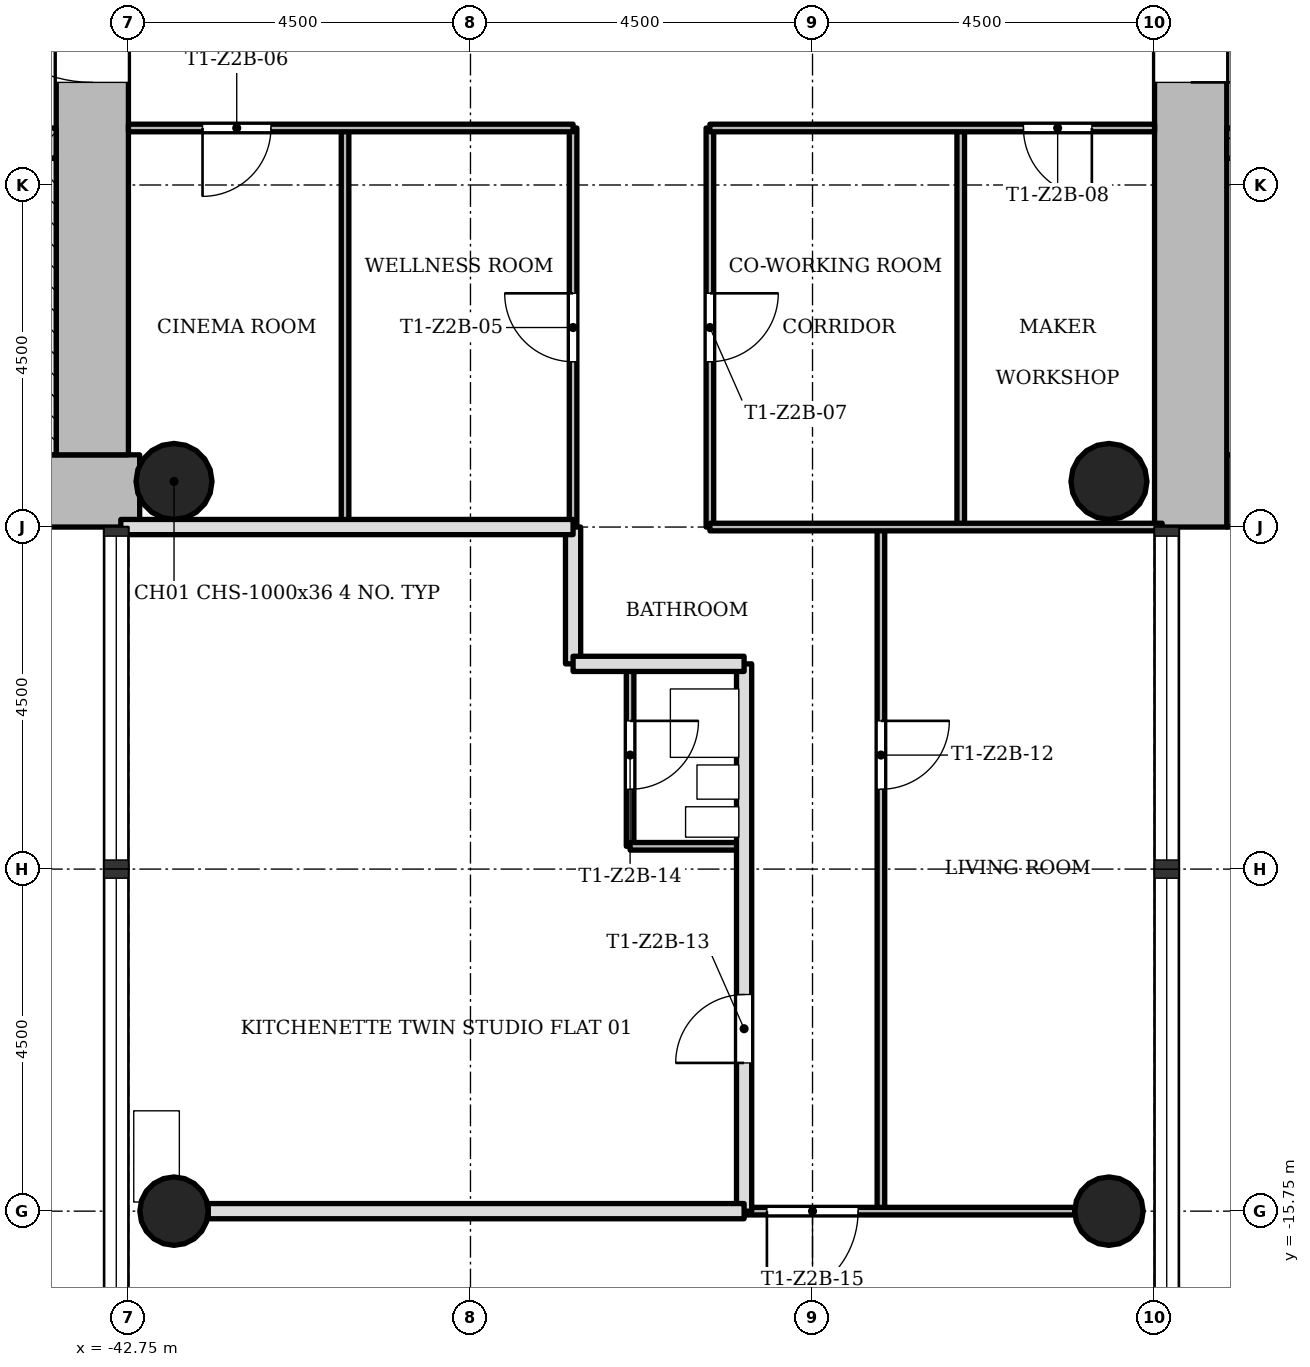
"""IFC4 building model, lengths in metres.
Left out: names, types, materials, properties, quantities, classifications, styles, units other than length and angle.
Written with IfcOpenShell. Run it as: python <this file> out.ifc"""

import sys

from ifc_helpers import new_model, si_unit, direction, frame, frame_2d, origin, origin_2d, place, context, subcontext, project, spatial, rectangle, hollow_circle, extrude, element, fill, save


model = new_model("IFC4")
c1 = context("Model", 3, precision=1e-05, world=origin(), true_north=direction((0.0, 1.0)))
c2 = subcontext(c1, "Body", "Model", "MODEL_VIEW")
j1 = project(units=[si_unit("LENGTHUNIT", "METRE"), si_unit("PLANEANGLEUNIT", "RADIAN")], contexts=[c1])
p1 = place(None, origin())
s1 = spatial("IfcSite", under=j1, at=p1, CompositionType="ELEMENT")
p2 = place(p1, origin())
s2 = spatial("IfcBuilding", under=s1, at=p2, CompositionType="ELEMENT")
p3 = place(p2, frame((0.0, 0.0, 83.4)))
s3 = spatial("IfcBuildingStorey", under=s2, at=p3, CompositionType="ELEMENT", Elevation=83.4)
p4 = place(p3, frame((-28.3, -6.275, 0.0), z_axis=(0.0, 0.0, 1.0), x_axis=(1.0, 0.0, 0.0)))
e1 = element("IfcWall", 1, at=p4, inside=s3, PredefinedType="SHEAR", context=c2, shape_type="SweptSolid", body=[
    extrude(rectangle(XDim=8.05, YDim=0.95, at=frame_2d((4.025, 0.0))), origin(), (0.0, 0.0, 1.0), 3.4),
])
p5 = place(p3, frame((-28.775, 5.8, 0.0), z_axis=(0.0, 0.0, 1.0), x_axis=(0.0, -1.0, 0.0)))
e2 = element("IfcWall", 2, at=p5, inside=s3, PredefinedType="SHEAR", context=c2, shape_type="SweptSolid", body=[
    extrude(rectangle(XDim=12.55, YDim=0.95, at=frame_2d((6.275, 0.0))), origin(), (0.0, 0.0, 1.0), 3.4),
])
p6 = place(p5, frame((4.9, 0.0, 0.0)))
e3 = element("IfcOpeningElement", 3, at=p6, cuts=e2, PredefinedType="OPENING", context=c2, shape_type="SweptSolid", body=[
    extrude(rectangle(XDim=1.8, YDim=2.1, at=frame_2d((0.9, 1.05))), frame((0.0, 0.485, 0.0), z_axis=(0.0, -1.0, 0.0), x_axis=(1.0, 0.0, 0.0)), (0.0, 0.0, 1.0), 0.97),
])
p7 = place(p3, frame((-28.3, -1.7, 0.0), z_axis=(0.0, 0.0, 1.0), x_axis=(1.0, 0.0, 0.0)))
e4 = element("IfcWall", 4, at=p7, inside=s3, PredefinedType="SHEAR", context=c2, shape_type="SweptSolid", body=[
    extrude(rectangle(XDim=7.1, YDim=0.4, at=frame_2d((3.55, 0.0))), origin(), (0.0, 0.0, 1.0), 3.4),
])
p8 = place(p7, frame((0.8, 0.0, 0.0)))
e5 = element("IfcOpeningElement", 5, at=p8, cuts=e4, PredefinedType="OPENING", context=c2, shape_type="SweptSolid", body=[
    extrude(rectangle(XDim=1.1, YDim=2.1, at=frame_2d((0.55, 1.05))), frame((0.0, 0.21, 0.0), z_axis=(0.0, -1.0, 0.0), x_axis=(1.0, 0.0, 0.0)), (0.0, 0.0, 1.0), 0.42),
])
p9 = place(p7, frame((3.0, 0.0, 0.0)))
e6 = element("IfcOpeningElement", 6, at=p9, cuts=e4, PredefinedType="OPENING", context=c2, shape_type="SweptSolid", body=[
    extrude(rectangle(XDim=1.1, YDim=2.1, at=frame_2d((0.55, 1.05))), frame((0.0, 0.21, 0.0), z_axis=(0.0, -1.0, 0.0), x_axis=(1.0, 0.0, 0.0)), (0.0, 0.0, 1.0), 0.42),
])
p10 = place(p7, frame((5.2, 0.0, 0.0)))
e7 = element("IfcOpeningElement", 7, at=p10, cuts=e4, PredefinedType="OPENING", context=c2, shape_type="SweptSolid", body=[
    extrude(rectangle(XDim=1.1, YDim=2.1, at=frame_2d((0.55, 1.05))), frame((0.0, 0.21, 0.0), z_axis=(0.0, -1.0, 0.0), x_axis=(1.0, 0.0, 0.0)), (0.0, 0.0, 1.0), 0.42),
])
p11 = place(p3, frame((-51.298, -6.275, 0.0), z_axis=(0.0, 0.0, 1.0), x_axis=(1.0, 0.0, 0.0)))
e8 = element("IfcWall", 8, at=p11, inside=s3, PredefinedType="SHEAR", context=c2, shape_type="SweptSolid", body=[
    extrude(rectangle(XDim=8.696, YDim=0.95, at=frame_2d((4.348, 0.0))), origin(), (0.0, 0.0, 1.0), 3.4),
])
p12 = place(p3, frame((-43.225, -5.8, 0.0), z_axis=(0.0, 0.0, 1.0), x_axis=(0.0, 1.0, 0.0)))
e9 = element("IfcWall", 9, at=p12, inside=s3, PredefinedType="SHEAR", context=c2, shape_type="SweptSolid", body=[
    extrude(rectangle(XDim=12.55, YDim=0.95, at=frame_2d((6.275, 0.0))), origin(), (0.0, 0.0, 1.0), 3.4),
])
p13 = place(p12, frame((4.9, 0.0, 0.0)))
e10 = element("IfcOpeningElement", 10, at=p13, cuts=e9, PredefinedType="OPENING", context=c2, shape_type="SweptSolid", body=[
    extrude(rectangle(XDim=1.8, YDim=2.1, at=frame_2d((0.9, 1.05))), frame((0.0, 0.485, 0.0), z_axis=(0.0, -1.0, 0.0), x_axis=(1.0, 0.0, 0.0)), (0.0, 0.0, 1.0), 0.97),
])
p14 = place(p3, frame((-50.8, -1.7, 0.0), z_axis=(0.0, 0.0, 1.0), x_axis=(1.0, 0.0, 0.0)))
e11 = element("IfcWall", 11, at=p14, inside=s3, PredefinedType="SHEAR", context=c2, shape_type="SweptSolid", body=[
    extrude(rectangle(XDim=7.1, YDim=0.4, at=frame_2d((3.55, 0.0))), origin(), (0.0, 0.0, 1.0), 3.4),
])
p15 = place(p14, frame((5.5, 0.0, 0.0)))
e12 = element("IfcOpeningElement", 12, at=p15, cuts=e11, PredefinedType="OPENING", context=c2, shape_type="SweptSolid", body=[
    extrude(rectangle(XDim=0.9, YDim=2.1, at=frame_2d((0.45, 1.05))), frame((0.0, 0.21, 0.0), z_axis=(0.0, -1.0, 0.0), x_axis=(1.0, 0.0, 0.0)), (0.0, 0.0, 1.0), 0.42),
])
for number, where, z_axis, x_axis in (
    (13, (-42.15, -15.75, 0.0), (0.0, 0.0, 1.0), (1.0, 0.0, 0.0)),
    (14, (-29.85, -15.75, 0.0), (0.0, 0.0, 1.0), (1.0, 0.0, 0.0)),
):
    element("IfcColumn", number, at=place(p3, frame(where, z_axis=z_axis, x_axis=x_axis)), inside=s3, PredefinedType="COLUMN", context=c2, shape_type="SweptSolid", body=[
        extrude(hollow_circle(Radius=0.45, WallThickness=0.032, at=origin_2d()), origin(), (0.0, 0.0, 1.0), 3.4),
    ])
for number, where, z_axis, x_axis in (
    (15, (-42.15, -6.15, 0.0), (0.0, 0.0, 1.0), (1.0, 0.0, 0.0)),
    (16, (-29.85, -6.15, 0.0), (0.0, 0.0, 1.0), (1.0, 0.0, 0.0)),
):
    element("IfcColumn", number, at=place(p3, frame(where, z_axis=z_axis, x_axis=x_axis)), inside=s3, PredefinedType="COLUMN", context=c2, shape_type="SweptSolid", body=[
        extrude(hollow_circle(Radius=0.5, WallThickness=0.036, at=origin_2d()), origin(), (0.0, 0.0, 1.0), 3.4),
    ])
p16 = place(p3, frame((-39.9, -6.75, 0.0), z_axis=(0.0, 0.0, 1.0), x_axis=(0.0, 1.0, 0.0)))
e17 = element("IfcWall", 17, at=p16, inside=s3, PredefinedType="PARTITIONING", context=c2, shape_type="SweptSolid", body=[
    extrude(rectangle(XDim=5.25, YDim=0.1, at=frame_2d((2.625, 0.0))), origin(), (0.0, 0.0, 1.0), 3.0),
])
p17 = place(p3, frame((-36.9, -6.75, 0.0), z_axis=(0.0, 0.0, 1.0), x_axis=(0.0, 1.0, 0.0)))
e18 = element("IfcWall", 18, at=p17, inside=s3, PredefinedType="PARTITIONING", context=c2, shape_type="SweptSolid", body=[
    extrude(rectangle(XDim=5.25, YDim=0.1, at=frame_2d((2.625, 0.0))), origin(), (0.0, 0.0, 1.0), 3.0),
])
p18 = place(p17, frame((2.175, 0.0, 0.0)))
e19 = element("IfcOpeningElement", 19, at=p18, cuts=e18, PredefinedType="OPENING", context=c2, shape_type="SweptSolid", body=[
    extrude(rectangle(XDim=0.9, YDim=2.1, at=frame_2d((0.45, 1.05))), frame((0.0, 0.06, 0.0), z_axis=(0.0, -1.0, 0.0), x_axis=(1.0, 0.0, 0.0)), (0.0, 0.0, 1.0), 0.12),
])
p19 = place(p3, frame((-36.9, -8.55, 0.0), z_axis=(0.0, 0.0, 1.0), x_axis=(0.0, 1.0, 0.0)))
e20 = element("IfcWall", 20, at=p19, inside=s3, PredefinedType="SOLIDWALL", context=c2, shape_type="SweptSolid", body=[
    extrude(rectangle(XDim=1.8, YDim=0.2, at=frame_2d((0.9, 0.0))), origin(), (0.0, 0.0, 1.0), 3.0),
])
p20 = place(p3, frame((-36.15, -10.95, 0.0), z_axis=(0.0, 0.0, 1.0), x_axis=(0.0, 1.0, 0.0)))
e21 = element("IfcWall", 21, at=p20, inside=s3, PredefinedType="PARTITIONING", context=c2, shape_type="SweptSolid", body=[
    extrude(rectangle(XDim=2.4, YDim=0.1, at=frame_2d((1.2, 0.0))), origin(), (0.0, 0.0, 1.0), 3.0),
])
p21 = place(p20, frame((0.75, 0.0, 0.0)))
e22 = element("IfcOpeningElement", 22, at=p21, cuts=e21, PredefinedType="OPENING", context=c2, shape_type="SweptSolid", body=[
    extrude(rectangle(XDim=0.9, YDim=2.1, at=frame_2d((0.45, 1.05))), frame((0.0, 0.06, 0.0), z_axis=(0.0, -1.0, 0.0), x_axis=(1.0, 0.0, 0.0)), (0.0, 0.0, 1.0), 0.12),
])
p22 = place(p3, frame((-35.1, -6.75, 0.0), z_axis=(0.0, 0.0, 1.0), x_axis=(0.0, 1.0, 0.0)))
e23 = element("IfcWall", 23, at=p22, inside=s3, PredefinedType="PARTITIONING", context=c2, shape_type="SweptSolid", body=[
    extrude(rectangle(XDim=5.25, YDim=0.1, at=frame_2d((2.625, 0.0))), origin(), (0.0, 0.0, 1.0), 3.0),
])
p23 = place(p22, frame((2.175, 0.0, 0.0)))
e24 = element("IfcOpeningElement", 24, at=p23, cuts=e23, PredefinedType="OPENING", context=c2, shape_type="SweptSolid", body=[
    extrude(rectangle(XDim=0.9, YDim=2.1, at=frame_2d((0.45, 1.05))), frame((0.0, 0.06, 0.0), z_axis=(0.0, -1.0, 0.0), x_axis=(1.0, 0.0, 0.0)), (0.0, 0.0, 1.0), 0.12),
])
p24 = place(p3, frame((-34.65, -15.75, 0.0), z_axis=(0.0, 0.0, 1.0), x_axis=(0.0, 1.0, 0.0)))
e25 = element("IfcWall", 25, at=p24, inside=s3, PredefinedType="SOLIDWALL", context=c2, shape_type="SweptSolid", body=[
    extrude(rectangle(XDim=7.2, YDim=0.2, at=frame_2d((3.6, 0.0))), origin(), (0.0, 0.0, 1.0), 3.0),
])
p25 = place(p24, frame((1.95, 0.0, 0.0)))
e26 = element("IfcOpeningElement", 26, at=p25, cuts=e25, PredefinedType="OPENING", context=c2, shape_type="SweptSolid", body=[
    extrude(rectangle(XDim=0.9, YDim=2.1, at=frame_2d((0.45, 1.05))), frame((0.0, 0.11, 0.0), z_axis=(0.0, -1.0, 0.0), x_axis=(1.0, 0.0, 0.0)), (0.0, 0.0, 1.0), 0.22),
])
p26 = place(p3, frame((-32.85, -15.75, 0.0), z_axis=(0.0, 0.0, 1.0), x_axis=(0.0, 1.0, 0.0)))
e27 = element("IfcWall", 27, at=p26, inside=s3, PredefinedType="PARTITIONING", context=c2, shape_type="SweptSolid", body=[
    extrude(rectangle(XDim=9.0, YDim=0.1, at=frame_2d((4.5, 0.0))), origin(), (0.0, 0.0, 1.0), 3.0),
])
p27 = place(p26, frame((5.55, 0.0, 0.0)))
e28 = element("IfcOpeningElement", 28, at=p27, cuts=e27, PredefinedType="OPENING", context=c2, shape_type="SweptSolid", body=[
    extrude(rectangle(XDim=0.9, YDim=2.1, at=frame_2d((0.45, 1.05))), frame((0.0, 0.06, 0.0), z_axis=(0.0, -1.0, 0.0), x_axis=(1.0, 0.0, 0.0)), (0.0, 0.0, 1.0), 0.12),
])
p28 = place(p3, frame((-31.8, -6.75, 0.0), z_axis=(0.0, 0.0, 1.0), x_axis=(0.0, 1.0, 0.0)))
e29 = element("IfcWall", 29, at=p28, inside=s3, PredefinedType="PARTITIONING", context=c2, shape_type="SweptSolid", body=[
    extrude(rectangle(XDim=5.25, YDim=0.1, at=frame_2d((2.625, 0.0))), origin(), (0.0, 0.0, 1.0), 3.0),
])
p29 = place(p3, frame((-34.65, -15.75, 0.0), z_axis=(0.0, 0.0, 1.0), x_axis=(1.0, 0.0, 0.0)))
e30 = element("IfcWall", 30, at=p29, inside=s3, PredefinedType="PARTITIONING", context=c2, shape_type="SweptSolid", body=[
    extrude(rectangle(XDim=4.35, YDim=0.1, at=frame_2d((2.175, 0.0))), origin(), (0.0, 0.0, 1.0), 3.0),
])
p30 = place(p29, frame((0.3, 0.0, 0.0)))
e31 = element("IfcOpeningElement", 31, at=p30, cuts=e30, PredefinedType="OPENING", context=c2, shape_type="SweptSolid", body=[
    extrude(rectangle(XDim=1.2, YDim=2.1, at=frame_2d((0.6, 1.05))), frame((0.0, 0.06, 0.0), z_axis=(0.0, -1.0, 0.0), x_axis=(1.0, 0.0, 0.0)), (0.0, 0.0, 1.0), 0.12),
])
p31 = place(p3, frame((-41.7, -15.75, 0.0), z_axis=(0.0, 0.0, 1.0), x_axis=(1.0, 0.0, 0.0)))
e32 = element("IfcWall", 32, at=p31, inside=s3, PredefinedType="SOLIDWALL", context=c2, shape_type="SweptSolid", body=[
    extrude(rectangle(XDim=7.05, YDim=0.2, at=frame_2d((3.525, 0.0))), origin(), (0.0, 0.0, 1.0), 3.0),
])
p32 = place(p3, frame((-36.15, -10.95, 0.0), z_axis=(0.0, 0.0, 1.0), x_axis=(1.0, 0.0, 0.0)))
e33 = element("IfcWall", 33, at=p32, inside=s3, PredefinedType="PARTITIONING", context=c2, shape_type="SweptSolid", body=[
    extrude(rectangle(XDim=1.5, YDim=0.1, at=frame_2d((0.75, 0.0))), origin(), (0.0, 0.0, 1.0), 3.0),
])
p33 = place(p3, frame((-36.9, -8.55, 0.0), z_axis=(0.0, 0.0, 1.0), x_axis=(1.0, 0.0, 0.0)))
e34 = element("IfcWall", 34, at=p33, inside=s3, PredefinedType="SOLIDWALL", context=c2, shape_type="SweptSolid", body=[
    extrude(rectangle(XDim=2.25, YDim=0.2, at=frame_2d((1.125, 0.0))), origin(), (0.0, 0.0, 1.0), 3.0),
])
p34 = place(p3, frame((-35.1, -6.75, 0.0), z_axis=(0.0, 0.0, 1.0), x_axis=(1.0, 0.0, 0.0)))
e35 = element("IfcWall", 35, at=p34, inside=s3, PredefinedType="PARTITIONING", context=c2, shape_type="SweptSolid", body=[
    extrude(rectangle(XDim=5.95, YDim=0.1, at=frame_2d((2.975, 0.0))), origin(), (0.0, 0.0, 1.0), 3.0),
])
p35 = place(p3, frame((-42.85, -6.75, 0.0), z_axis=(0.0, 0.0, 1.0), x_axis=(1.0, 0.0, 0.0)))
e36 = element("IfcWall", 36, at=p35, inside=s3, PredefinedType="SOLIDWALL", context=c2, shape_type="SweptSolid", body=[
    extrude(rectangle(XDim=5.95, YDim=0.2, at=frame_2d((2.975, 0.0))), origin(), (0.0, 0.0, 1.0), 3.0),
])
p36 = place(p3, frame((-42.75, -1.5, 0.0), z_axis=(0.0, 0.0, 1.0), x_axis=(1.0, 0.0, 0.0)))
e37 = element("IfcWall", 37, at=p36, inside=s3, PredefinedType="PARTITIONING", context=c2, shape_type="SweptSolid", body=[
    extrude(rectangle(XDim=5.85, YDim=0.1, at=frame_2d((2.925, 0.0))), origin(), (0.0, 0.0, 1.0), 3.0),
])
p37 = place(p36, frame((0.975, 0.0, 0.0)))
e38 = element("IfcOpeningElement", 38, at=p37, cuts=e37, PredefinedType="OPENING", context=c2, shape_type="SweptSolid", body=[
    extrude(rectangle(XDim=0.9, YDim=2.1, at=frame_2d((0.45, 1.05))), frame((0.0, 0.06, 0.0), z_axis=(0.0, -1.0, 0.0), x_axis=(1.0, 0.0, 0.0)), (0.0, 0.0, 1.0), 0.12),
])
p38 = place(p3, frame((-35.1, -1.5, 0.0), z_axis=(0.0, 0.0, 1.0), x_axis=(1.0, 0.0, 0.0)))
e39 = element("IfcWall", 39, at=p38, inside=s3, PredefinedType="PARTITIONING", context=c2, shape_type="SweptSolid", body=[
    extrude(rectangle(XDim=5.85, YDim=0.1, at=frame_2d((2.925, 0.0))), origin(), (0.0, 0.0, 1.0), 3.0),
])
p39 = place(p38, frame((4.125, 0.0, 0.0)))
e40 = element("IfcOpeningElement", 40, at=p39, cuts=e39, PredefinedType="OPENING", context=c2, shape_type="SweptSolid", body=[
    extrude(rectangle(XDim=0.9, YDim=2.1, at=frame_2d((0.45, 1.05))), frame((0.0, 0.06, 0.0), z_axis=(0.0, -1.0, 0.0), x_axis=(1.0, 0.0, 0.0)), (0.0, 0.0, 1.0), 0.12),
])
p40 = place(p3, frame((-43.825, -1.9, 0.0), z_axis=(0.0, 0.0, 1.0), x_axis=(0.0, -1.0, 0.0)))
e41 = element("IfcWall", 41, at=p40, inside=s3, PredefinedType="SHEAR", context=c2, shape_type="SweptSolid", body=[
    extrude(rectangle(XDim=3.9, YDim=0.25, at=frame_2d((1.95, 0.0))), origin(), (0.0, 0.0, 1.0), 3.4),
])
p41 = place(p18, origin())
e42 = element("IfcDoor", 42, at=p41, inside=s3, OperationType="SINGLE_SWING_LEFT", PredefinedType="DOOR", context=c2, shape_type="SweptSolid", body=[
    extrude(rectangle(XDim=0.9, YDim=2.1, at=frame_2d((0.45, 1.05))), frame((0.0, 0.025, 0.0), z_axis=(0.0, -1.0, 0.0), x_axis=(1.0, 0.0, 0.0)), (0.0, 0.0, 1.0), 0.05),
])
fill(e19, e42)
p42 = place(p37, origin())
e43 = element("IfcDoor", 43, at=p42, inside=s3, OperationType="SINGLE_SWING_LEFT", PredefinedType="DOOR", context=c2, shape_type="SweptSolid", body=[
    extrude(rectangle(XDim=0.9, YDim=2.1, at=frame_2d((0.45, 1.05))), frame((0.0, 0.025, 0.0), z_axis=(0.0, -1.0, 0.0), x_axis=(1.0, 0.0, 0.0)), (0.0, 0.0, 1.0), 0.05),
])
fill(e38, e43)
p43 = place(p23, origin())
e44 = element("IfcDoor", 44, at=p43, inside=s3, OperationType="SINGLE_SWING_RIGHT", PredefinedType="DOOR", context=c2, shape_type="SweptSolid", body=[
    extrude(rectangle(XDim=0.9, YDim=2.1, at=frame_2d((0.45, 1.05))), frame((0.0, 0.025, 0.0), z_axis=(0.0, -1.0, 0.0), x_axis=(1.0, 0.0, 0.0)), (0.0, 0.0, 1.0), 0.05),
])
fill(e24, e44)
p44 = place(p39, origin())
e45 = element("IfcDoor", 45, at=p44, inside=s3, OperationType="SINGLE_SWING_RIGHT", PredefinedType="DOOR", context=c2, shape_type="SweptSolid", body=[
    extrude(rectangle(XDim=0.9, YDim=2.1, at=frame_2d((0.45, 1.05))), frame((0.0, 0.025, 0.0), z_axis=(0.0, -1.0, 0.0), x_axis=(1.0, 0.0, 0.0)), (0.0, 0.0, 1.0), 0.05),
])
fill(e40, e45)
p45 = place(p27, origin())
e46 = element("IfcDoor", 46, at=p45, inside=s3, OperationType="SINGLE_SWING_RIGHT", PredefinedType="DOOR", context=c2, shape_type="SweptSolid", body=[
    extrude(rectangle(XDim=0.9, YDim=2.1, at=frame_2d((0.45, 1.05))), frame((0.0, 0.025, 0.0), z_axis=(0.0, -1.0, 0.0), x_axis=(1.0, 0.0, 0.0)), (0.0, 0.0, 1.0), 0.05),
])
fill(e28, e46)
p46 = place(p25, origin())
e47 = element("IfcDoor", 47, at=p46, inside=s3, OperationType="SINGLE_SWING_RIGHT", PredefinedType="DOOR", context=c2, shape_type="SweptSolid", body=[
    extrude(rectangle(XDim=0.9, YDim=2.1, at=frame_2d((0.45, 1.05))), frame((0.0, 0.025, 0.0), z_axis=(0.0, -1.0, 0.0), x_axis=(1.0, 0.0, 0.0)), (0.0, 0.0, 1.0), 0.05),
])
fill(e26, e47)
p47 = place(p21, origin())
e48 = element("IfcDoor", 48, at=p47, inside=s3, OperationType="SINGLE_SWING_RIGHT", PredefinedType="DOOR", context=c2, shape_type="SweptSolid", body=[
    extrude(rectangle(XDim=0.9, YDim=2.1, at=frame_2d((0.45, 1.05))), frame((0.0, 0.025, 0.0), z_axis=(0.0, -1.0, 0.0), x_axis=(1.0, 0.0, 0.0)), (0.0, 0.0, 1.0), 0.05),
])
fill(e22, e48)
p48 = place(p30, origin())
e49 = element("IfcDoor", 49, at=p48, inside=s3, OperationType="SINGLE_SWING_LEFT", PredefinedType="DOOR", context=c2, shape_type="SweptSolid", body=[
    extrude(rectangle(XDim=1.2, YDim=2.1, at=frame_2d((0.6, 1.05))), frame((0.0, 0.025, 0.0), z_axis=(0.0, -1.0, 0.0), x_axis=(1.0, 0.0, 0.0)), (0.0, 0.0, 1.0), 0.05),
])
fill(e31, e49)
p49 = place(p6, origin())
e50 = element("IfcDoor", 50, at=p49, inside=s3, OperationType="SINGLE_SWING_LEFT", PredefinedType="DOOR", context=c2, shape_type="SweptSolid", body=[
    extrude(rectangle(XDim=1.8, YDim=2.1, at=frame_2d((0.9, 1.05))), frame((0.0, 0.025, 0.0), z_axis=(0.0, -1.0, 0.0), x_axis=(1.0, 0.0, 0.0)), (0.0, 0.0, 1.0), 0.05),
])
fill(e3, e50)
p50 = place(p13, origin())
e51 = element("IfcDoor", 51, at=p50, inside=s3, OperationType="SINGLE_SWING_LEFT", PredefinedType="DOOR", context=c2, shape_type="SweptSolid", body=[
    extrude(rectangle(XDim=1.8, YDim=2.1, at=frame_2d((0.9, 1.05))), frame((0.0, 0.025, 0.0), z_axis=(0.0, -1.0, 0.0), x_axis=(1.0, 0.0, 0.0)), (0.0, 0.0, 1.0), 0.05),
])
fill(e10, e51)
save(model, sys.argv[1])
